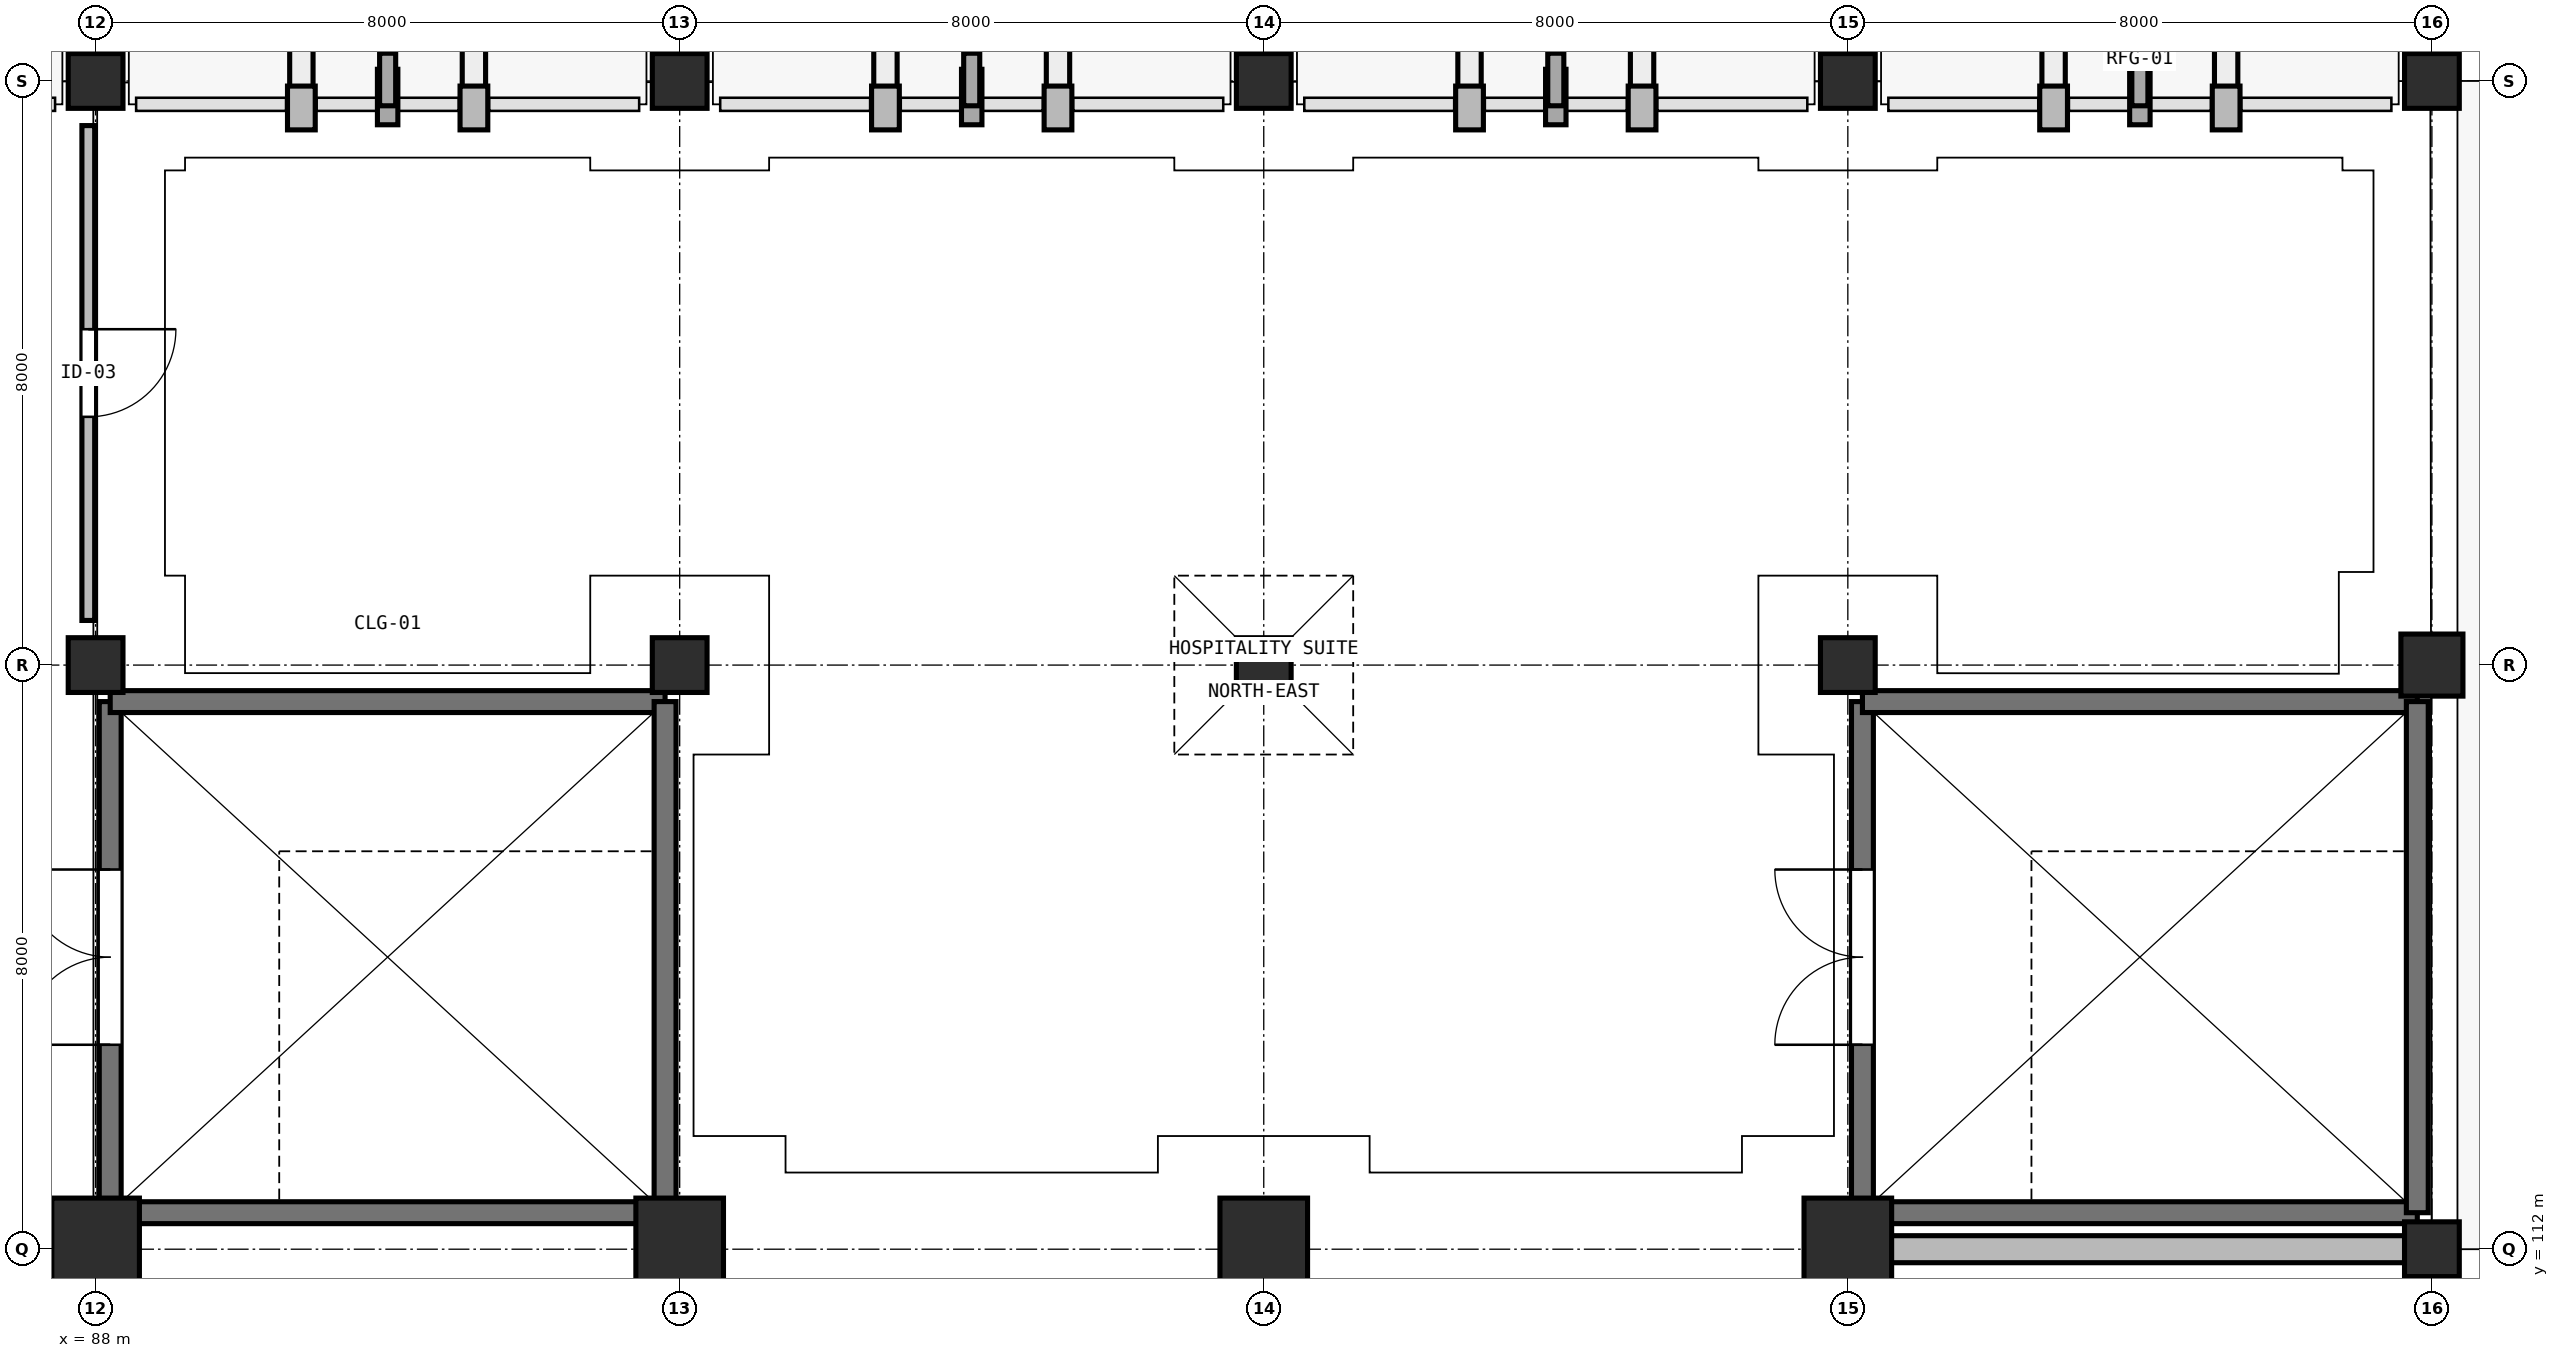
"""IFC4 building model, lengths in metres.
Left out: names, types, materials, properties, quantities, classifications, styles, units other than length and angle.
Written with IfcOpenShell. Run it as: python <this file> out.ifc"""

import sys

from ifc_helpers import new_model, si_unit, direction, frame, frame_2d, origin, origin_2d, place, context, subcontext, project, spatial, rectangle, extrude, element, fill, save


model = new_model("IFC4")
c1 = context("Model", 3, precision=1e-05, world=origin(), true_north=direction((0.0, 1.0)))
c2 = subcontext(c1, "Body", "Model", "MODEL_VIEW")
j1 = project(units=[si_unit("LENGTHUNIT", "METRE"), si_unit("PLANEANGLEUNIT", "RADIAN")], contexts=[c1])
p1 = place(None, origin())
s1 = spatial("IfcSite", under=j1, at=p1, CompositionType="ELEMENT")
p2 = place(p1, origin())
s2 = spatial("IfcBuilding", under=s1, at=p2, CompositionType="ELEMENT")
p3 = place(p2, frame((0.0, 0.0, 5.4)))
s3 = spatial("IfcBuildingStorey", under=s2, at=p3, CompositionType="ELEMENT", Elevation=5.4)
p4 = place(p3, frame((88.0, 112.0, 0.0), z_axis=(0.0, 0.0, 1.0), x_axis=(1.0, 0.0, 0.0)))
e1 = element("IfcColumn", 1, at=p4, inside=s3, PredefinedType="COLUMN", context=c2, shape_type="SweptSolid", body=[
    extrude(rectangle(XDim=1.2, YDim=1.4, at=origin_2d()), origin(), (0.0, 0.0, 1.0), 4.8),
])
for number, where, z_axis, x_axis in (
    (2, (88.0, 120.0, 0.0), (0.0, 0.0, 1.0), (1.0, 0.0, 0.0)),
    (3, (88.0, 128.0, 0.0), (0.0, 0.0, 1.0), (1.0, 0.0, 0.0)),
):
    element("IfcColumn", number, at=place(p3, frame(where, z_axis=z_axis, x_axis=x_axis)), inside=s3, PredefinedType="COLUMN", context=c2, shape_type="SweptSolid", body=[
        extrude(rectangle(XDim=0.75, YDim=0.75, at=origin_2d()), origin(), (0.0, 0.0, 1.0), 4.8),
    ])
p5 = place(p3, frame((96.0, 112.0, 0.0), z_axis=(0.0, 0.0, 1.0), x_axis=(1.0, 0.0, 0.0)))
e4 = element("IfcColumn", 4, at=p5, inside=s3, PredefinedType="COLUMN", context=c2, shape_type="SweptSolid", body=[
    extrude(rectangle(XDim=1.2, YDim=1.4, at=origin_2d()), origin(), (0.0, 0.0, 1.0), 4.8),
])
for number, where, z_axis, x_axis in (
    (5, (96.0, 120.0, 0.0), (0.0, 0.0, 1.0), (1.0, 0.0, 0.0)),
    (6, (96.0, 128.0, 0.0), (0.0, 0.0, 1.0), (1.0, 0.0, 0.0)),
):
    element("IfcColumn", number, at=place(p3, frame(where, z_axis=z_axis, x_axis=x_axis)), inside=s3, PredefinedType="COLUMN", context=c2, shape_type="SweptSolid", body=[
        extrude(rectangle(XDim=0.75, YDim=0.75, at=origin_2d()), origin(), (0.0, 0.0, 1.0), 4.8),
    ])
p6 = place(p3, frame((104.0, 112.0, 0.0), z_axis=(0.0, 0.0, 1.0), x_axis=(1.0, 0.0, 0.0)))
e7 = element("IfcColumn", 7, at=p6, inside=s3, PredefinedType="COLUMN", context=c2, shape_type="SweptSolid", body=[
    extrude(rectangle(XDim=1.2, YDim=1.4, at=origin_2d()), origin(), (0.0, 0.0, 1.0), 4.8),
])
for number, where, z_axis, x_axis in (
    (8, (104.0, 120.0, 0.0), (0.0, 0.0, 1.0), (1.0, 0.0, 0.0)),
    (9, (104.0, 128.0, 0.0), (0.0, 0.0, 1.0), (1.0, 0.0, 0.0)),
):
    element("IfcColumn", number, at=place(p3, frame(where, z_axis=z_axis, x_axis=x_axis)), inside=s3, PredefinedType="COLUMN", context=c2, shape_type="SweptSolid", body=[
        extrude(rectangle(XDim=0.75, YDim=0.75, at=origin_2d()), origin(), (0.0, 0.0, 1.0), 4.8),
    ])
p7 = place(p3, frame((112.0, 112.0, 0.0), z_axis=(0.0, 0.0, 1.0), x_axis=(1.0, 0.0, 0.0)))
e10 = element("IfcColumn", 10, at=p7, inside=s3, PredefinedType="COLUMN", context=c2, shape_type="SweptSolid", body=[
    extrude(rectangle(XDim=1.2, YDim=1.4, at=origin_2d()), origin(), (0.0, 0.0, 1.0), 4.8),
])
for number, where, z_axis, x_axis in (
    (11, (112.0, 120.0, 0.0), (0.0, 0.0, 1.0), (1.0, 0.0, 0.0)),
    (12, (112.0, 128.0, 0.0), (0.0, 0.0, 1.0), (1.0, 0.0, 0.0)),
    (13, (120.0, 112.0, 0.0), (0.0, 0.0, 1.0), (1.0, 0.0, 0.0)),
):
    element("IfcColumn", number, at=place(p3, frame(where, z_axis=z_axis, x_axis=x_axis)), inside=s3, PredefinedType="COLUMN", context=c2, shape_type="SweptSolid", body=[
        extrude(rectangle(XDim=0.75, YDim=0.75, at=origin_2d()), origin(), (0.0, 0.0, 1.0), 4.8),
    ])
p8 = place(p3, frame((120.0, 120.0, 0.0), z_axis=(0.0, 0.0, 1.0), x_axis=(1.0, 0.0, 0.0)))
e14 = element("IfcColumn", 14, at=p8, inside=s3, PredefinedType="COLUMN", context=c2, shape_type="SweptSolid", body=[
    extrude(rectangle(XDim=0.85, YDim=0.85, at=origin_2d()), origin(), (0.0, 0.0, 1.0), 4.8),
])
p9 = place(p3, frame((120.0, 128.0, 0.0), z_axis=(0.0, 0.0, 1.0), x_axis=(1.0, 0.0, 0.0)))
e15 = element("IfcColumn", 15, at=p9, inside=s3, PredefinedType="COLUMN", context=c2, shape_type="SweptSolid", body=[
    extrude(rectangle(XDim=0.75, YDim=0.75, at=origin_2d()), origin(), (0.0, 0.0, 1.0), 4.8),
])
p10 = place(p3, frame((119.645, 112.0, 0.0), z_axis=(0.0, 0.0, 1.0), x_axis=(-1.0, 0.0, 0.0)))
e16 = element("IfcWall", 16, at=p10, inside=s3, PredefinedType="SOLIDWALL", context=c2, shape_type="SweptSolid", body=[
    extrude(rectangle(XDim=7.065, YDim=0.37, at=frame_2d((3.532, 0.0))), origin(), (0.0, 0.0, 1.0), 3.45),
])
for number, where, z_axis, x_axis in (
    (17, (114.818, 127.33, 0.0), (0.0, 0.0, 1.0), (0.0, 1.0, 0.0)),
    (18, (117.182, 127.33, 0.0), (0.0, 0.0, 1.0), (0.0, 1.0, 0.0)),
    (19, (106.818, 127.33, 0.0), (0.0, 0.0, 1.0), (0.0, 1.0, 0.0)),
    (20, (109.182, 127.33, 0.0), (0.0, 0.0, 1.0), (0.0, 1.0, 0.0)),
    (21, (98.818, 127.33, 0.0), (0.0, 0.0, 1.0), (0.0, 1.0, 0.0)),
    (22, (101.182, 127.33, 0.0), (0.0, 0.0, 1.0), (0.0, 1.0, 0.0)),
    (23, (90.818, 127.33, 0.0), (0.0, 0.0, 1.0), (0.0, 1.0, 0.0)),
    (24, (93.182, 127.33, 0.0), (0.0, 0.0, 1.0), (0.0, 1.0, 0.0)),
):
    element("IfcWall", number, at=place(p3, frame(where, z_axis=z_axis, x_axis=x_axis)), inside=s3, PredefinedType="SOLIDWALL", context=c2, shape_type="SweptSolid", body=[
        extrude(rectangle(XDim=0.6, YDim=0.38, at=frame_2d((0.3, 0.0))), origin(), (0.0, 0.0, 1.0), 3.6),
    ])
p11 = place(p3, frame((95.8, 112.5, 0.0), z_axis=(0.0, 0.0, 1.0), x_axis=(-1.0, 0.0, 0.0)))
e25 = element("IfcWall", 25, at=p11, inside=s3, PredefinedType="SHEAR", context=c2, shape_type="SweptSolid", body=[
    extrude(rectangle(XDim=7.6, YDim=0.3, at=frame_2d((3.8, 0.0))), origin(), (0.0, 0.0, 1.0), 4.48),
])
p12 = place(p3, frame((88.2, 112.5, 0.0), z_axis=(0.0, 0.0, 1.0), x_axis=(0.0, 1.0, 0.0)))
e26 = element("IfcWall", 26, at=p12, inside=s3, PredefinedType="SHEAR", context=c2, shape_type="SweptSolid", body=[
    extrude(rectangle(XDim=7.0, YDim=0.3, at=frame_2d((3.5, 0.0))), origin(), (0.0, 0.0, 1.0), 4.48),
])
p13 = place(p12, frame((2.3, 0.0, 0.0)))
e27 = element("IfcOpeningElement", 27, at=p13, cuts=e26, PredefinedType="OPENING", context=c2, shape_type="SweptSolid", body=[
    extrude(rectangle(XDim=2.4, YDim=2.2, at=frame_2d((1.2, 1.1))), frame((0.0, 0.16, 0.0), z_axis=(0.0, -1.0, 0.0), x_axis=(1.0, 0.0, 0.0)), (0.0, 0.0, 1.0), 0.32),
])
p14 = place(p3, frame((88.2, 119.5, 0.0), z_axis=(0.0, 0.0, 1.0), x_axis=(1.0, 0.0, 0.0)))
e28 = element("IfcWall", 28, at=p14, inside=s3, PredefinedType="SHEAR", context=c2, shape_type="SweptSolid", body=[
    extrude(rectangle(XDim=7.6, YDim=0.3, at=frame_2d((3.8, 0.0))), origin(), (0.0, 0.0, 1.0), 4.48),
])
p15 = place(p3, frame((95.8, 119.5, 0.0), z_axis=(0.0, 0.0, 1.0), x_axis=(0.0, -1.0, 0.0)))
e29 = element("IfcWall", 29, at=p15, inside=s3, PredefinedType="SHEAR", context=c2, shape_type="SweptSolid", body=[
    extrude(rectangle(XDim=7.0, YDim=0.3, at=frame_2d((3.5, 0.0))), origin(), (0.0, 0.0, 1.0), 4.48),
])
p16 = place(p3, frame((119.8, 112.5, 0.0), z_axis=(0.0, 0.0, 1.0), x_axis=(-1.0, 0.0, 0.0)))
e30 = element("IfcWall", 30, at=p16, inside=s3, PredefinedType="SHEAR", context=c2, shape_type="SweptSolid", body=[
    extrude(rectangle(XDim=7.6, YDim=0.3, at=frame_2d((3.8, 0.0))), origin(), (0.0, 0.0, 1.0), 4.48),
])
p17 = place(p3, frame((112.2, 112.5, 0.0), z_axis=(0.0, 0.0, 1.0), x_axis=(0.0, 1.0, 0.0)))
e31 = element("IfcWall", 31, at=p17, inside=s3, PredefinedType="SHEAR", context=c2, shape_type="SweptSolid", body=[
    extrude(rectangle(XDim=7.0, YDim=0.3, at=frame_2d((3.5, 0.0))), origin(), (0.0, 0.0, 1.0), 4.48),
])
p18 = place(p17, frame((2.3, 0.0, 0.0)))
e32 = element("IfcOpeningElement", 32, at=p18, cuts=e31, PredefinedType="OPENING", context=c2, shape_type="SweptSolid", body=[
    extrude(rectangle(XDim=2.4, YDim=2.2, at=frame_2d((1.2, 1.1))), frame((0.0, 0.16, 0.0), z_axis=(0.0, -1.0, 0.0), x_axis=(1.0, 0.0, 0.0)), (0.0, 0.0, 1.0), 0.32),
])
p19 = place(p3, frame((112.2, 119.5, 0.0), z_axis=(0.0, 0.0, 1.0), x_axis=(1.0, 0.0, 0.0)))
e33 = element("IfcWall", 33, at=p19, inside=s3, PredefinedType="SHEAR", context=c2, shape_type="SweptSolid", body=[
    extrude(rectangle(XDim=7.6, YDim=0.3, at=frame_2d((3.8, 0.0))), origin(), (0.0, 0.0, 1.0), 4.48),
])
p20 = place(p3, frame((119.8, 119.5, 0.0), z_axis=(0.0, 0.0, 1.0), x_axis=(0.0, -1.0, 0.0)))
e34 = element("IfcWall", 34, at=p20, inside=s3, PredefinedType="SHEAR", context=c2, shape_type="SweptSolid", body=[
    extrude(rectangle(XDim=7.0, YDim=0.3, at=frame_2d((3.5, 0.0))), origin(), (0.0, 0.0, 1.0), 4.48),
])
p21 = place(p3, frame((87.9, 127.389, 0.0), z_axis=(0.0, 0.0, 1.0), x_axis=(0.0, -1.0, 0.0)))
e35 = element("IfcWall", 35, at=p21, inside=s3, PredefinedType="PARTITIONING", context=c2, shape_type="SweptSolid", body=[
    extrude(rectangle(XDim=6.778, YDim=0.175, at=frame_2d((3.389, 0.0))), origin(), (0.0, 0.0, 1.0), 3.45),
])
p22 = place(p21, frame((2.789, 0.0, 0.0)))
e36 = element("IfcOpeningElement", 36, at=p22, cuts=e35, PredefinedType="OPENING", context=c2, shape_type="SweptSolid", body=[
    extrude(rectangle(XDim=1.2, YDim=2.2, at=frame_2d((0.6, 1.1))), frame((0.0, 0.098, 0.0), z_axis=(0.0, -1.0, 0.0), x_axis=(1.0, 0.0, 0.0)), (0.0, 0.0, 1.0), 0.195),
])
p23 = place(p13, frame((2.4, 0.0, 0.0), z_axis=(0.0, 0.0, 1.0), x_axis=(-1.0, 0.0, 0.0)))
e37 = element("IfcDoor", 37, at=p23, inside=s3, OperationType="DOUBLE_DOOR_SINGLE_SWING", PredefinedType="DOOR", context=c2, shape_type="SweptSolid", body=[
    extrude(rectangle(XDim=2.4, YDim=2.2, at=frame_2d((1.2, 1.1))), frame((0.0, 0.025, 0.0), z_axis=(0.0, -1.0, 0.0), x_axis=(1.0, 0.0, 0.0)), (0.0, 0.0, 1.0), 0.05),
])
fill(e27, e37)
p24 = place(p18, frame((2.4, 0.0, 0.0), z_axis=(0.0, 0.0, 1.0), x_axis=(-1.0, 0.0, 0.0)))
e38 = element("IfcDoor", 38, at=p24, inside=s3, OperationType="DOUBLE_DOOR_SINGLE_SWING", PredefinedType="DOOR", context=c2, shape_type="SweptSolid", body=[
    extrude(rectangle(XDim=2.4, YDim=2.2, at=frame_2d((1.2, 1.1))), frame((0.0, 0.025, 0.0), z_axis=(0.0, -1.0, 0.0), x_axis=(1.0, 0.0, 0.0)), (0.0, 0.0, 1.0), 0.05),
])
fill(e32, e38)
p25 = place(p22, origin())
e39 = element("IfcDoor", 39, at=p25, inside=s3, OperationType="SINGLE_SWING_LEFT", PredefinedType="DOOR", context=c2, shape_type="SweptSolid", body=[
    extrude(rectangle(XDim=1.2, YDim=2.2, at=frame_2d((0.6, 1.1))), frame((0.0, 0.025, 0.0), z_axis=(0.0, -1.0, 0.0), x_axis=(1.0, 0.0, 0.0)), (0.0, 0.0, 1.0), 0.05),
])
fill(e36, e39)
save(model, sys.argv[1])
